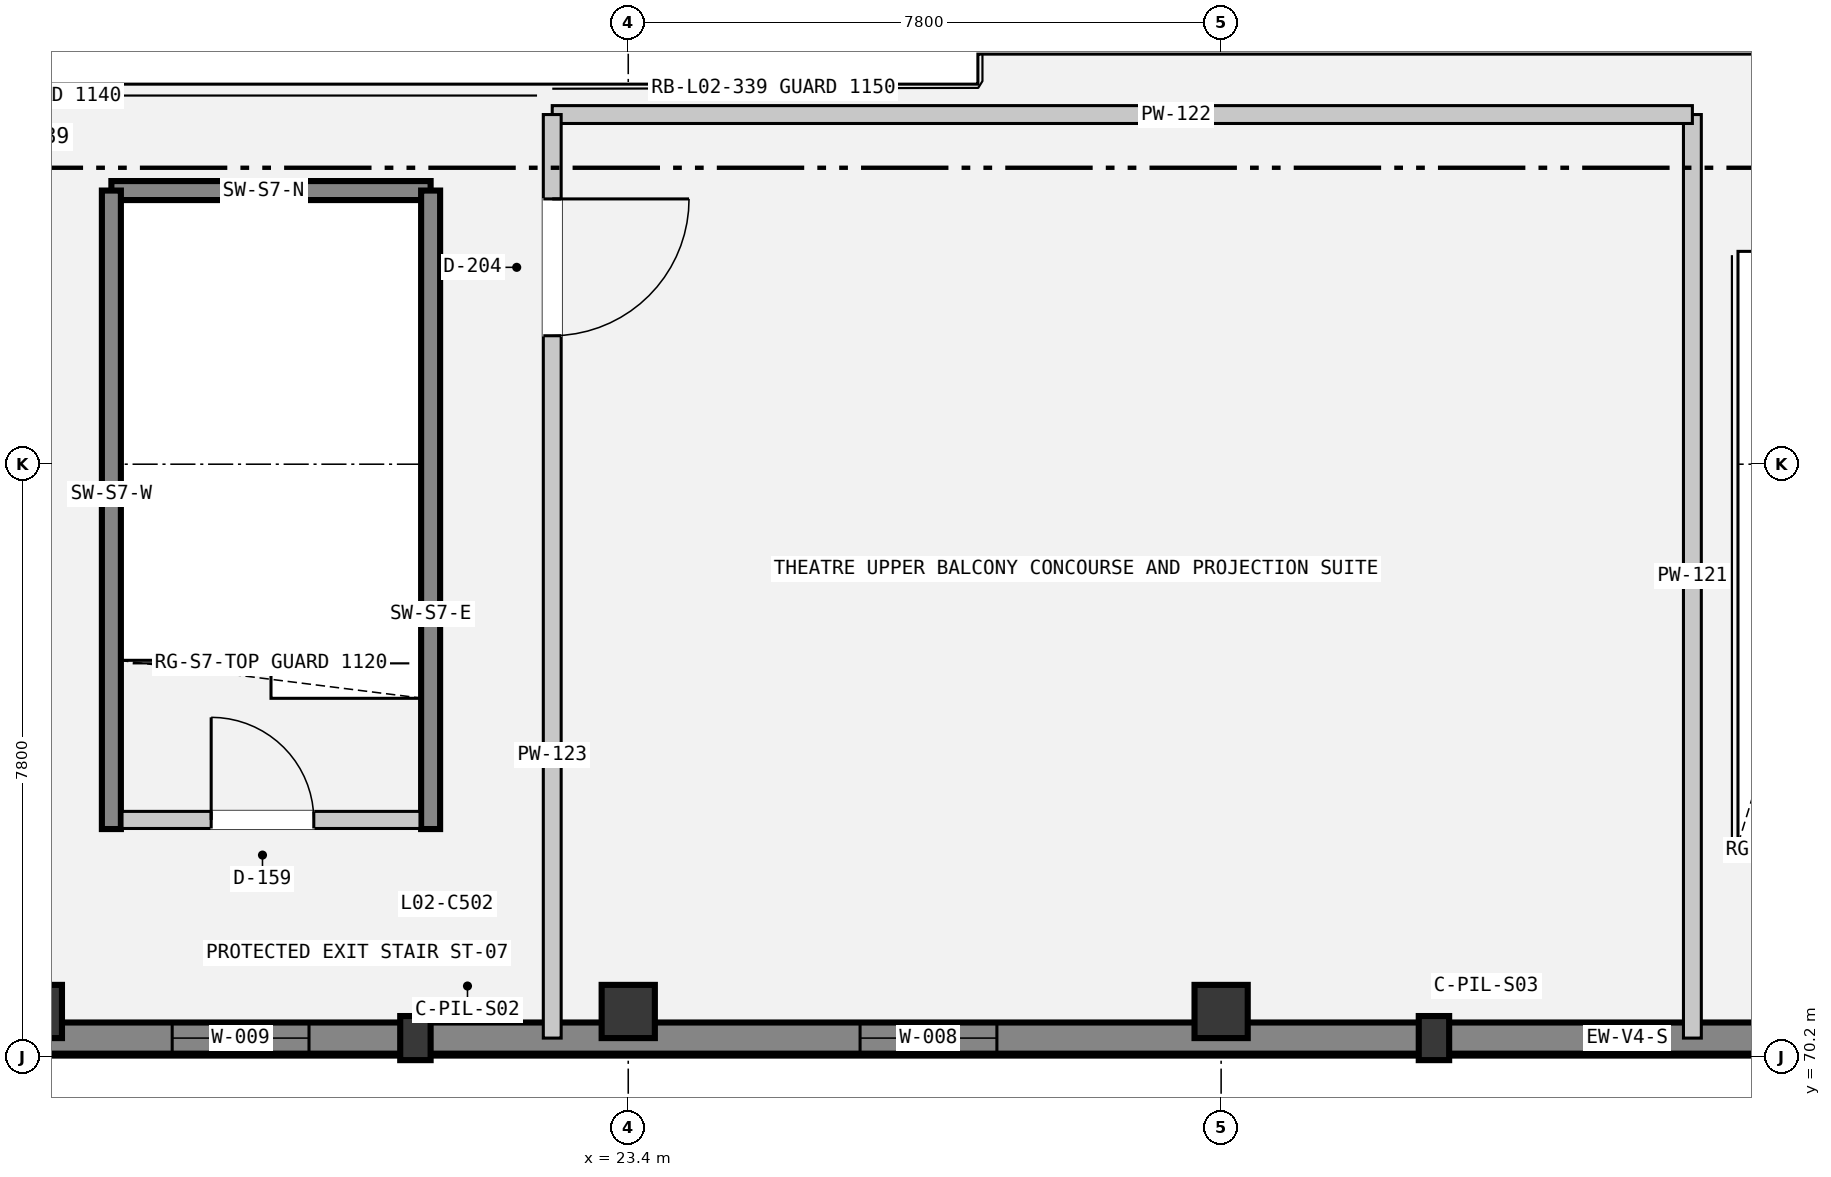
"""IFC4 building model, lengths in metres.
Left out: names, types, materials, properties, quantities, classifications, styles, units other than length and angle.
Written with IfcOpenShell. Run it as: python <this file> out.ifc"""

import sys

from ifc_helpers import new_model, si_unit, direction, frame, frame_2d, origin, origin_2d, place, context, subcontext, project, spatial, rectangle, extrude, element, fill, save


model = new_model("IFC4")
c1 = context("Model", 3, precision=1e-05, world=origin(), true_north=direction((0.0, 1.0)))
c2 = subcontext(c1, "Body", "Model", "MODEL_VIEW")
j1 = project(units=[si_unit("LENGTHUNIT", "METRE"), si_unit("PLANEANGLEUNIT", "RADIAN")], contexts=[c1])
p1 = place(None, origin())
s1 = spatial("IfcSite", under=j1, at=p1, CompositionType="ELEMENT")
p2 = place(p1, origin())
s2 = spatial("IfcBuilding", under=s1, at=p2, CompositionType="ELEMENT")
p3 = place(p2, frame((0.0, 0.0, 10.2)))
s3 = spatial("IfcBuildingStorey", under=s2, at=p3, CompositionType="ELEMENT", Elevation=10.2)
for number, where, z_axis, x_axis in (
    (1, (15.6, 70.8, 0.0), (0.0, 0.0, 1.0), (1.0, 0.0, 0.0)),
    (2, (23.4, 70.8, 0.0), (0.0, 0.0, 1.0), (1.0, 0.0, 0.0)),
    (3, (31.2, 70.8, 0.0), (0.0, 0.0, 1.0), (1.0, 0.0, 0.0)),
):
    element("IfcColumn", number, at=place(p3, frame(where, z_axis=z_axis, x_axis=x_axis)), inside=s3, PredefinedType="COLUMN", context=c2, shape_type="SweptSolid", body=[
        extrude(rectangle(XDim=0.7, YDim=0.7, at=origin_2d()), origin(), (0.0, 0.0, 1.0), 4.8),
    ])
for number, where, z_axis, x_axis in (
    (4, (20.6, 70.45, 0.0), (0.0, 0.0, 1.0), (1.0, 0.0, 0.0)),
    (5, (34.0, 70.45, 0.0), (0.0, 0.0, 1.0), (1.0, 0.0, 0.0)),
):
    element("IfcColumn", number, at=place(p3, frame(where, z_axis=z_axis, x_axis=x_axis)), inside=s3, PredefinedType="PILASTER", context=c2, shape_type="SweptSolid", body=[
        extrude(rectangle(XDim=0.4, YDim=0.58, at=origin_2d()), origin(), (0.0, 0.0, 1.0), 4.8),
    ])
p4 = place(p3, frame((16.6, 81.6, 0.0), z_axis=(0.0, 0.0, 1.0), x_axis=(1.0, 0.0, 0.0)))
e6 = element("IfcWall", 6, at=p4, inside=s3, PredefinedType="SHEAR", context=c2, shape_type="SweptSolid", body=[
    extrude(rectangle(XDim=4.2, YDim=0.25, at=frame_2d((2.1, 0.0))), origin(), (0.0, 0.0, 1.0), 4.8),
])
for number, where, z_axis, x_axis in (
    (7, (16.6, 73.2, 0.0), (0.0, 0.0, 1.0), (0.0, 1.0, 0.0)),
    (8, (20.8, 73.2, 0.0), (0.0, 0.0, 1.0), (0.0, 1.0, 0.0)),
):
    element("IfcWall", number, at=place(p3, frame(where, z_axis=z_axis, x_axis=x_axis)), inside=s3, PredefinedType="SHEAR", context=c2, shape_type="SweptSolid", body=[
        extrude(rectangle(XDim=8.4, YDim=0.25, at=frame_2d((4.2, 0.0))), origin(), (0.0, 0.0, 1.0), 4.8),
    ])
p5 = place(p3, frame((46.45, 70.45, 0.0), z_axis=(0.0, 0.0, 1.0), x_axis=(-1.0, 0.0, 0.0)))
e9 = element("IfcWall", 9, at=p5, inside=s3, PredefinedType="SOLIDWALL", context=c2, shape_type="SweptSolid", body=[
    extrude(rectangle(XDim=35.45, YDim=0.41, at=frame_2d((17.725, 0.0))), origin(), (0.0, 0.0, 1.0), 4.8),
])
p6 = place(p5, frame((2.55, 0.0, 0.95)))
e10 = element("IfcOpeningElement", 10, at=p6, cuts=e9, PredefinedType="OPENING", context=c2, shape_type="SweptSolid", body=[
    extrude(rectangle(XDim=1.8, YDim=2.1, at=frame_2d((0.9, 1.05))), frame((0.0, 0.215, 0.0), z_axis=(0.0, -1.0, 0.0), x_axis=(1.0, 0.0, 0.0)), (0.0, 0.0, 1.0), 0.43),
])
p7 = place(p5, frame((18.2, 0.0, 0.95)))
e11 = element("IfcOpeningElement", 11, at=p7, cuts=e9, PredefinedType="OPENING", context=c2, shape_type="SweptSolid", body=[
    extrude(rectangle(XDim=1.8, YDim=2.1, at=frame_2d((0.9, 1.05))), frame((0.0, 0.215, 0.0), z_axis=(0.0, -1.0, 0.0), x_axis=(1.0, 0.0, 0.0)), (0.0, 0.0, 1.0), 0.43),
])
p8 = place(p5, frame((27.25, 0.0, 0.95)))
e12 = element("IfcOpeningElement", 12, at=p8, cuts=e9, PredefinedType="OPENING", context=c2, shape_type="SweptSolid", body=[
    extrude(rectangle(XDim=1.8, YDim=2.1, at=frame_2d((0.9, 1.05))), frame((0.0, 0.215, 0.0), z_axis=(0.0, -1.0, 0.0), x_axis=(1.0, 0.0, 0.0)), (0.0, 0.0, 1.0), 0.43),
])
p9 = place(p3, frame((16.74, 73.32, 0.0), z_axis=(0.0, 0.0, 1.0), x_axis=(1.0, 0.0, 0.0)))
e13 = element("IfcWall", 13, at=p9, inside=s3, PredefinedType="PARTITIONING", context=c2, shape_type="SweptSolid", body=[
    extrude(rectangle(XDim=3.92, YDim=0.225, at=frame_2d((1.96, 0.0))), origin(), (0.0, 0.0, 1.0), 3.51),
])
p10 = place(p9, frame((1.173, 0.0, 0.0)))
e14 = element("IfcOpeningElement", 14, at=p10, cuts=e13, PredefinedType="OPENING", context=c2, shape_type="SweptSolid", body=[
    extrude(rectangle(XDim=1.35, YDim=2.2, at=frame_2d((0.675, 1.1))), frame((0.0, 0.123, 0.0), z_axis=(0.0, -1.0, 0.0), x_axis=(1.0, 0.0, 0.0)), (0.0, 0.0, 1.0), 0.245),
])
p11 = place(p3, frame((37.4, 70.45, 0.0), z_axis=(0.0, 0.0, 1.0), x_axis=(0.0, 1.0, 0.0)))
e15 = element("IfcWall", 15, at=p11, inside=s3, PredefinedType="PARTITIONING", context=c2, shape_type="SweptSolid", body=[
    extrude(rectangle(XDim=12.15, YDim=0.235, at=frame_2d((6.075, 0.0))), origin(), (0.0, 0.0, 1.0), 3.45),
])
p12 = place(p3, frame((37.4, 82.6, 0.0), z_axis=(0.0, 0.0, 1.0), x_axis=(-1.0, 0.0, 0.0)))
e16 = element("IfcWall", 16, at=p12, inside=s3, PredefinedType="PARTITIONING", context=c2, shape_type="SweptSolid", body=[
    extrude(rectangle(XDim=15.0, YDim=0.235, at=frame_2d((7.5, 0.0))), origin(), (0.0, 0.0, 1.0), 3.45),
])
p13 = place(p3, frame((22.4, 82.6, 0.0), z_axis=(0.0, 0.0, 1.0), x_axis=(0.0, -1.0, 0.0)))
e17 = element("IfcWall", 17, at=p13, inside=s3, PredefinedType="PARTITIONING", context=c2, shape_type="SweptSolid", body=[
    extrude(rectangle(XDim=12.15, YDim=0.235, at=frame_2d((6.075, 0.0))), origin(), (0.0, 0.0, 1.0), 3.45),
])
p14 = place(p13, frame((1.11, 0.0, 0.0)))
e18 = element("IfcOpeningElement", 18, at=p14, cuts=e17, PredefinedType="OPENING", context=c2, shape_type="SweptSolid", body=[
    extrude(rectangle(XDim=1.8, YDim=2.35, at=frame_2d((0.9, 1.175))), frame((0.0, 0.127, 0.0), z_axis=(0.0, -1.0, 0.0), x_axis=(1.0, 0.0, 0.0)), (0.0, 0.0, 1.0), 0.255),
])
p15 = place(p7, origin())
e19 = element("IfcWindow", 19, at=p15, inside=s3, PartitioningType="SINGLE_PANEL", PredefinedType="WINDOW", context=c2, shape_type="SweptSolid", body=[
    extrude(rectangle(XDim=1.8, YDim=2.1, at=frame_2d((0.9, 1.05))), frame((0.0, 0.03, 0.0), z_axis=(0.0, -1.0, 0.0), x_axis=(1.0, 0.0, 0.0)), (0.0, 0.0, 1.0), 0.06),
])
fill(e11, e19)
p16 = place(p8, origin())
e20 = element("IfcWindow", 20, at=p16, inside=s3, PartitioningType="SINGLE_PANEL", PredefinedType="WINDOW", context=c2, shape_type="SweptSolid", body=[
    extrude(rectangle(XDim=1.8, YDim=2.1, at=frame_2d((0.9, 1.05))), frame((0.0, 0.03, 0.0), z_axis=(0.0, -1.0, 0.0), x_axis=(1.0, 0.0, 0.0)), (0.0, 0.0, 1.0), 0.06),
])
fill(e12, e20)
p17 = place(p10, origin())
e21 = element("IfcDoor", 21, at=p17, inside=s3, OperationType="SINGLE_SWING_LEFT", PredefinedType="DOOR", context=c2, shape_type="SweptSolid", body=[
    extrude(rectangle(XDim=1.35, YDim=2.2, at=frame_2d((0.675, 1.1))), frame((0.0, 0.025, 0.0), z_axis=(0.0, -1.0, 0.0), x_axis=(1.0, 0.0, 0.0)), (0.0, 0.0, 1.0), 0.05),
])
fill(e14, e21)
p18 = place(p14, origin())
e22 = element("IfcDoor", 22, at=p18, inside=s3, OperationType="DOUBLE_DOOR_SINGLE_SWING", PredefinedType="DOOR", context=c2, shape_type="SweptSolid", body=[
    extrude(rectangle(XDim=1.8, YDim=2.35, at=frame_2d((0.9, 1.175))), frame((0.0, 0.025, 0.0), z_axis=(0.0, -1.0, 0.0), x_axis=(1.0, 0.0, 0.0)), (0.0, 0.0, 1.0), 0.05),
])
fill(e18, e22)
save(model, sys.argv[1])
